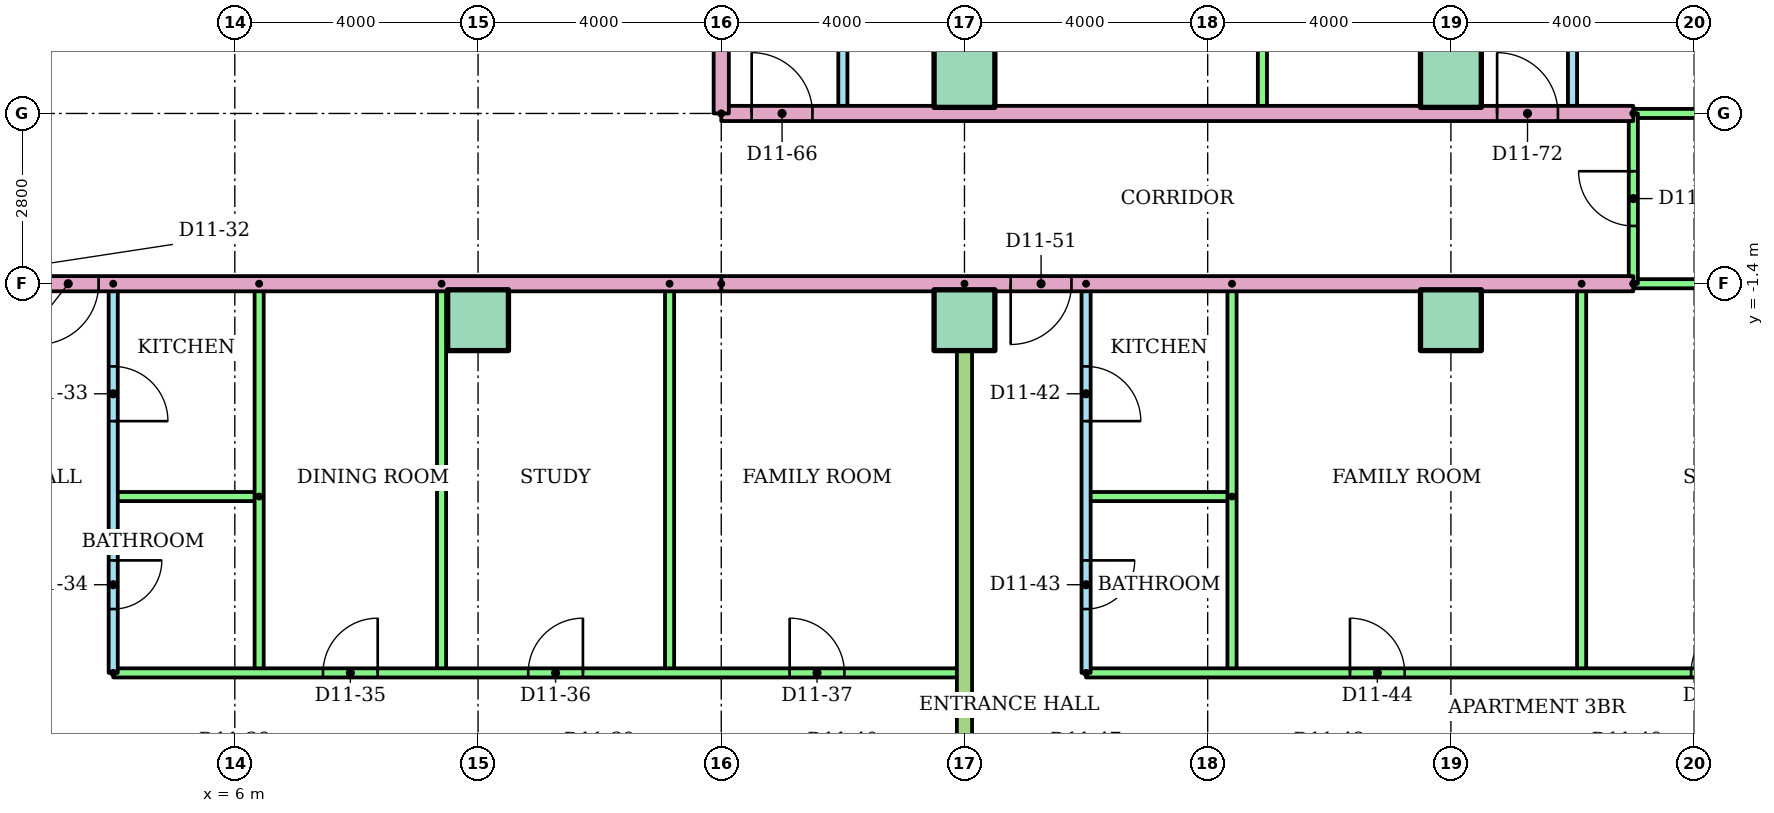
"""IFC4 building model, lengths in metres.
Left out: names, types, materials, properties, quantities, classifications, styles, units other than length and angle.
Written with IfcOpenShell. Run it as: python <this file> out.ifc"""

import sys

from ifc_helpers import new_model, si_unit, direction, frame, frame_2d, origin, origin_2d, place, context, subcontext, project, spatial, rectangle, extrude, element, fill, save


model = new_model("IFC4")
c1 = context("Model", 3, precision=1e-05, world=origin(), true_north=direction((0.0, 1.0)))
c2 = subcontext(c1, "Body", "Model", "MODEL_VIEW")
j1 = project(units=[si_unit("LENGTHUNIT", "METRE"), si_unit("PLANEANGLEUNIT", "RADIAN")], contexts=[c1])
p1 = place(None, origin())
s1 = spatial("IfcSite", under=j1, at=p1, CompositionType="ELEMENT")
p2 = place(p1, origin())
s2 = spatial("IfcBuilding", under=s1, at=p2, CompositionType="ELEMENT")
p3 = place(p2, frame((0.0, 0.0, 44.8)))
s3 = spatial("IfcBuildingStorey", under=s2, at=p3, CompositionType="ELEMENT", Elevation=44.8)
for number, where in (
    (1, (10.0, -2.0, 0.0)),
    (2, (18.0, -2.0, 0.0)),
    (3, (26.0, -2.0, 0.0)),
    (4, (18.0, 2.0, 0.0)),
    (5, (26.0, 2.0, 0.0)),
):
    element("IfcColumn", number, at=place(p3, frame(where)), inside=s3, PredefinedType="COLUMN", context=c2, shape_type="SweptSolid", body=[
        extrude(rectangle(XDim=1.0, YDim=1.0, at=origin_2d()), origin(), (0.0, 0.0, 1.0), 3.2),
    ])
p4 = place(p3, frame((4.0, -1.4, 0.0), z_axis=(0.0, 0.0, 1.0), x_axis=(0.0, -1.0, 0.0)))
e6 = element("IfcWall", 6, at=p4, inside=s3, PredefinedType="PARTITIONING", context=c2, shape_type="SweptSolid", body=[
    extrude(rectangle(XDim=6.4, YDim=0.15, at=frame_2d((3.2, 0.0))), origin(), (0.0, 0.0, 1.0), 2.4),
])
p5 = place(p4, frame((1.36, 0.0, 0.0)))
e7 = element("IfcOpeningElement", 7, at=p5, cuts=e6, PredefinedType="OPENING", context=c2, shape_type="SweptSolid", body=[
    extrude(rectangle(XDim=0.9, YDim=2.1, at=frame_2d((0.45, 1.05))), frame((0.0, 0.085, 0.0), z_axis=(0.0, -1.0, 0.0), x_axis=(1.0, 0.0, 0.0)), (0.0, 0.0, 1.0), 0.17),
])
p6 = place(p4, frame((4.55, 0.0, 0.0)))
e8 = element("IfcOpeningElement", 8, at=p6, cuts=e6, PredefinedType="OPENING", context=c2, shape_type="SweptSolid", body=[
    extrude(rectangle(XDim=0.8, YDim=2.1, at=frame_2d((0.4, 1.05))), frame((0.0, 0.085, 0.0), z_axis=(0.0, -1.0, 0.0), x_axis=(1.0, 0.0, 0.0)), (0.0, 0.0, 1.0), 0.17),
])
p7 = place(p3, frame((6.4, -4.9, 0.0), z_axis=(0.0, 0.0, 1.0), x_axis=(-1.0, 0.0, 0.0)))
e9 = element("IfcWall", 9, at=p7, inside=s3, PredefinedType="PARTITIONING", context=c2, shape_type="SweptSolid", body=[
    extrude(rectangle(XDim=2.4, YDim=0.15, at=frame_2d((1.2, 0.0))), origin(), (0.0, 0.0, 1.0), 2.4),
])
for number, where, z_axis, x_axis in (
    (10, (6.4, -1.4, 0.0), (0.0, 0.0, 1.0), (0.0, -1.0, 0.0)),
    (11, (9.4, -1.4, 0.0), (0.0, 0.0, 1.0), (0.0, -1.0, 0.0)),
    (12, (13.15, -1.4, 0.0), (0.0, 0.0, 1.0), (0.0, -1.0, 0.0)),
):
    element("IfcWall", number, at=place(p3, frame(where, z_axis=z_axis, x_axis=x_axis)), inside=s3, PredefinedType="PARTITIONING", context=c2, shape_type="SweptSolid", body=[
        extrude(rectangle(XDim=6.4, YDim=0.15, at=frame_2d((3.2, 0.0))), origin(), (0.0, 0.0, 1.0), 2.4),
    ])
p8 = place(p3, frame((4.0, -7.8, 0.0)))
e13 = element("IfcWall", 13, at=p8, inside=s3, PredefinedType="PARTITIONING", context=c2, shape_type="SweptSolid", body=[
    extrude(rectangle(XDim=14.0, YDim=0.15, at=frame_2d((7.0, 0.0))), origin(), (0.0, 0.0, 1.0), 2.4),
])
p9 = place(p8, frame((3.45, 0.0, 0.0)))
e14 = element("IfcOpeningElement", 14, at=p9, cuts=e13, PredefinedType="OPENING", context=c2, shape_type="SweptSolid", body=[
    extrude(rectangle(XDim=0.9, YDim=2.1, at=frame_2d((0.45, 1.05))), frame((0.0, 0.085, 0.0), z_axis=(0.0, -1.0, 0.0), x_axis=(1.0, 0.0, 0.0)), (0.0, 0.0, 1.0), 0.17),
])
p10 = place(p8, frame((6.825, 0.0, 0.0)))
e15 = element("IfcOpeningElement", 15, at=p10, cuts=e13, PredefinedType="OPENING", context=c2, shape_type="SweptSolid", body=[
    extrude(rectangle(XDim=0.9, YDim=2.1, at=frame_2d((0.45, 1.05))), frame((0.0, 0.085, 0.0), z_axis=(0.0, -1.0, 0.0), x_axis=(1.0, 0.0, 0.0)), (0.0, 0.0, 1.0), 0.17),
])
p11 = place(p8, frame((11.125, 0.0, 0.0)))
e16 = element("IfcOpeningElement", 16, at=p11, cuts=e13, PredefinedType="OPENING", context=c2, shape_type="SweptSolid", body=[
    extrude(rectangle(XDim=0.9, YDim=2.1, at=frame_2d((0.45, 1.05))), frame((0.0, 0.085, 0.0), z_axis=(0.0, -1.0, 0.0), x_axis=(1.0, 0.0, 0.0)), (0.0, 0.0, 1.0), 0.17),
])
p12 = place(p3, frame((20.0, -1.4, 0.0), z_axis=(0.0, 0.0, 1.0), x_axis=(0.0, -1.0, 0.0)))
e17 = element("IfcWall", 17, at=p12, inside=s3, PredefinedType="PARTITIONING", context=c2, shape_type="SweptSolid", body=[
    extrude(rectangle(XDim=6.4, YDim=0.15, at=frame_2d((3.2, 0.0))), origin(), (0.0, 0.0, 1.0), 2.4),
])
p13 = place(p12, frame((1.36, 0.0, 0.0)))
e18 = element("IfcOpeningElement", 18, at=p13, cuts=e17, PredefinedType="OPENING", context=c2, shape_type="SweptSolid", body=[
    extrude(rectangle(XDim=0.9, YDim=2.1, at=frame_2d((0.45, 1.05))), frame((0.0, 0.085, 0.0), z_axis=(0.0, -1.0, 0.0), x_axis=(1.0, 0.0, 0.0)), (0.0, 0.0, 1.0), 0.17),
])
p14 = place(p12, frame((4.55, 0.0, 0.0)))
e19 = element("IfcOpeningElement", 19, at=p14, cuts=e17, PredefinedType="OPENING", context=c2, shape_type="SweptSolid", body=[
    extrude(rectangle(XDim=0.8, YDim=2.1, at=frame_2d((0.4, 1.05))), frame((0.0, 0.085, 0.0), z_axis=(0.0, -1.0, 0.0), x_axis=(1.0, 0.0, 0.0)), (0.0, 0.0, 1.0), 0.17),
])
p15 = place(p3, frame((22.4, -4.9, 0.0), z_axis=(0.0, 0.0, 1.0), x_axis=(-1.0, 0.0, 0.0)))
e20 = element("IfcWall", 20, at=p15, inside=s3, PredefinedType="PARTITIONING", context=c2, shape_type="SweptSolid", body=[
    extrude(rectangle(XDim=2.4, YDim=0.15, at=frame_2d((1.2, 0.0))), origin(), (0.0, 0.0, 1.0), 2.4),
])
for number, where, z_axis, x_axis in (
    (21, (22.4, -1.4, 0.0), (0.0, 0.0, 1.0), (0.0, -1.0, 0.0)),
    (22, (28.15, -1.4, 0.0), (0.0, 0.0, 1.0), (0.0, -1.0, 0.0)),
):
    element("IfcWall", number, at=place(p3, frame(where, z_axis=z_axis, x_axis=x_axis)), inside=s3, PredefinedType="PARTITIONING", context=c2, shape_type="SweptSolid", body=[
        extrude(rectangle(XDim=6.4, YDim=0.15, at=frame_2d((3.2, 0.0))), origin(), (0.0, 0.0, 1.0), 2.4),
    ])
p16 = place(p3, frame((20.0, -7.8, 0.0)))
e23 = element("IfcWall", 23, at=p16, inside=s3, PredefinedType="PARTITIONING", context=c2, shape_type="SweptSolid", body=[
    extrude(rectangle(XDim=16.52, YDim=0.15, at=frame_2d((8.26, 0.0))), origin(), (0.0, 0.0, 1.0), 2.4),
])
p17 = place(p16, frame((4.34, 0.0, 0.0)))
e24 = element("IfcOpeningElement", 24, at=p17, cuts=e23, PredefinedType="OPENING", context=c2, shape_type="SweptSolid", body=[
    extrude(rectangle(XDim=0.9, YDim=2.1, at=frame_2d((0.45, 1.05))), frame((0.0, 0.085, 0.0), z_axis=(0.0, -1.0, 0.0), x_axis=(1.0, 0.0, 0.0)), (0.0, 0.0, 1.0), 0.17),
])
p18 = place(p16, frame((9.95, 0.0, 0.0)))
e25 = element("IfcOpeningElement", 25, at=p18, cuts=e23, PredefinedType="OPENING", context=c2, shape_type="SweptSolid", body=[
    extrude(rectangle(XDim=0.9, YDim=2.1, at=frame_2d((0.45, 1.05))), frame((0.0, 0.085, 0.0), z_axis=(0.0, -1.0, 0.0), x_axis=(1.0, 0.0, 0.0)), (0.0, 0.0, 1.0), 0.17),
])
p19 = place(p16, frame((14.76, 0.0, 0.0)))
e26 = element("IfcOpeningElement", 26, at=p19, cuts=e23, PredefinedType="OPENING", context=c2, shape_type="SweptSolid", body=[
    extrude(rectangle(XDim=0.9, YDim=2.1, at=frame_2d((0.45, 1.05))), frame((0.0, 0.085, 0.0), z_axis=(0.0, -1.0, 0.0), x_axis=(1.0, 0.0, 0.0)), (0.0, 0.0, 1.0), 0.17),
])
p20 = place(p3, frame((18.0, -1.4, 0.0), z_axis=(0.0, 0.0, 1.0), x_axis=(0.0, -1.0, 0.0)))
e27 = element("IfcWall", 27, at=p20, inside=s3, PredefinedType="PARTITIONING", context=c2, shape_type="SweptSolid", body=[
    extrude(rectangle(XDim=14.71, YDim=0.25, at=frame_2d((7.355, 0.0))), origin(), (0.0, 0.0, 1.0), 2.4),
])
p21 = place(p3, frame((29.0, -1.4, 0.0), z_axis=(0.0, 0.0, 1.0), x_axis=(-1.0, 0.0, 0.0)))
e28 = element("IfcWall", 28, at=p21, inside=s3, PredefinedType="PARTITIONING", context=c2, shape_type="SweptSolid", body=[
    extrude(rectangle(XDim=15.0, YDim=0.25, at=frame_2d((7.5, 0.0))), origin(), (0.0, 0.0, 1.0), 2.4),
])
p22 = place(p21, frame((9.24, 0.0, 0.0)))
e29 = element("IfcOpeningElement", 29, at=p22, cuts=e28, PredefinedType="OPENING", context=c2, shape_type="SweptSolid", body=[
    extrude(rectangle(XDim=1.0, YDim=2.1, at=frame_2d((0.5, 1.05))), frame((0.0, 0.135, 0.0), z_axis=(0.0, -1.0, 0.0), x_axis=(1.0, 0.0, 0.0)), (0.0, 0.0, 1.0), 0.27),
])
p23 = place(p3, frame((36.52, -1.4, 0.0), z_axis=(0.0, 0.0, 1.0), x_axis=(-1.0, 0.0, 0.0)))
e30 = element("IfcWall", 30, at=p23, inside=s3, PredefinedType="PARTITIONING", context=c2, shape_type="SweptSolid", body=[
    extrude(rectangle(XDim=7.52, YDim=0.15, at=frame_2d((3.76, 0.0))), origin(), (0.0, 0.0, 1.0), 2.4),
])
p24 = place(p3, frame((16.0, 10.2, 0.0), z_axis=(0.0, 0.0, 1.0), x_axis=(0.0, -1.0, 0.0)))
e31 = element("IfcWall", 31, at=p24, inside=s3, PredefinedType="PARTITIONING", context=c2, shape_type="SweptSolid", body=[
    extrude(rectangle(XDim=8.8, YDim=0.15, at=frame_2d((4.4, 0.0))), origin(), (0.0, 0.0, 1.0), 2.4),
])
p25 = place(p24, frame((5.975, 0.0, 0.0)))
e32 = element("IfcOpeningElement", 32, at=p25, cuts=e31, PredefinedType="OPENING", context=c2, shape_type="SweptSolid", body=[
    extrude(rectangle(XDim=0.9, YDim=2.1, at=frame_2d((0.45, 1.05))), frame((0.0, 0.085, 0.0), z_axis=(0.0, -1.0, 0.0), x_axis=(1.0, 0.0, 0.0)), (0.0, 0.0, 1.0), 0.17),
])
p26 = place(p24, frame((1.625, 0.0, 0.0)))
e33 = element("IfcOpeningElement", 33, at=p26, cuts=e31, PredefinedType="OPENING", context=c2, shape_type="SweptSolid", body=[
    extrude(rectangle(XDim=0.8, YDim=2.1, at=frame_2d((0.4, 1.05))), frame((0.0, 0.085, 0.0), z_axis=(0.0, -1.0, 0.0), x_axis=(1.0, 0.0, 0.0)), (0.0, 0.0, 1.0), 0.17),
])
for number, where, z_axis, x_axis in (
    (34, (18.4, 10.2, 0.0), (0.0, 0.0, 1.0), (0.0, -1.0, 0.0)),
    (35, (22.9, 10.2, 0.0), (0.0, 0.0, 1.0), (0.0, -1.0, 0.0)),
):
    element("IfcWall", number, at=place(p3, frame(where, z_axis=z_axis, x_axis=x_axis)), inside=s3, PredefinedType="PARTITIONING", context=c2, shape_type="SweptSolid", body=[
        extrude(rectangle(XDim=8.8, YDim=0.15, at=frame_2d((4.4, 0.0))), origin(), (0.0, 0.0, 1.0), 2.4),
    ])
p27 = place(p3, frame((28.0, 10.2, 0.0), z_axis=(0.0, 0.0, 1.0), x_axis=(0.0, -1.0, 0.0)))
e36 = element("IfcWall", 36, at=p27, inside=s3, PredefinedType="PARTITIONING", context=c2, shape_type="SweptSolid", body=[
    extrude(rectangle(XDim=8.8, YDim=0.15, at=frame_2d((4.4, 0.0))), origin(), (0.0, 0.0, 1.0), 2.4),
])
p28 = place(p27, frame((5.975, 0.0, 0.0)))
e37 = element("IfcOpeningElement", 37, at=p28, cuts=e36, PredefinedType="OPENING", context=c2, shape_type="SweptSolid", body=[
    extrude(rectangle(XDim=0.9, YDim=2.1, at=frame_2d((0.45, 1.05))), frame((0.0, 0.085, 0.0), z_axis=(0.0, -1.0, 0.0), x_axis=(1.0, 0.0, 0.0)), (0.0, 0.0, 1.0), 0.17),
])
p29 = place(p27, frame((1.625, 0.0, 0.0)))
e38 = element("IfcOpeningElement", 38, at=p29, cuts=e36, PredefinedType="OPENING", context=c2, shape_type="SweptSolid", body=[
    extrude(rectangle(XDim=0.8, YDim=2.1, at=frame_2d((0.4, 1.05))), frame((0.0, 0.085, 0.0), z_axis=(0.0, -1.0, 0.0), x_axis=(1.0, 0.0, 0.0)), (0.0, 0.0, 1.0), 0.17),
])
p30 = place(p3, frame((26.0, 18.521, 0.0), z_axis=(0.0, 0.0, 1.0), x_axis=(0.0, -1.0, 0.0)))
e39 = element("IfcWall", 39, at=p30, inside=s3, PredefinedType="PARTITIONING", context=c2, shape_type="SweptSolid", body=[
    extrude(rectangle(XDim=17.121, YDim=0.25, at=frame_2d((8.561, 0.0))), origin(), (0.0, 0.0, 1.0), 2.4),
])
p31 = place(p3, frame((14.0, 1.4, 0.0)))
e40 = element("IfcWall", 40, at=p31, inside=s3, PredefinedType="PARTITIONING", context=c2, shape_type="SweptSolid", body=[
    extrude(rectangle(XDim=15.0, YDim=0.25, at=frame_2d((7.5, 0.0))), origin(), (0.0, 0.0, 1.0), 2.4),
])
p32 = place(p31, frame((0.5, 0.0, 0.0)))
e41 = element("IfcOpeningElement", 41, at=p32, cuts=e40, PredefinedType="OPENING", context=c2, shape_type="SweptSolid", body=[
    extrude(rectangle(XDim=1.0, YDim=2.1, at=frame_2d((0.5, 1.05))), frame((0.0, 0.135, 0.0), z_axis=(0.0, -1.0, 0.0), x_axis=(1.0, 0.0, 0.0)), (0.0, 0.0, 1.0), 0.27),
])
p33 = place(p31, frame((12.76, 0.0, 0.0)))
e42 = element("IfcOpeningElement", 42, at=p33, cuts=e40, PredefinedType="OPENING", context=c2, shape_type="SweptSolid", body=[
    extrude(rectangle(XDim=1.0, YDim=2.1, at=frame_2d((0.5, 1.05))), frame((0.0, 0.135, 0.0), z_axis=(0.0, -1.0, 0.0), x_axis=(1.0, 0.0, 0.0)), (0.0, 0.0, 1.0), 0.27),
])
p34 = place(p3, frame((29.0, 1.4, 0.0)))
e43 = element("IfcWall", 43, at=p34, inside=s3, PredefinedType="PARTITIONING", context=c2, shape_type="SweptSolid", body=[
    extrude(rectangle(XDim=7.52, YDim=0.15, at=frame_2d((3.76, 0.0))), origin(), (0.0, 0.0, 1.0), 2.4),
])
p35 = place(p3, frame((29.0, -1.4, 0.0), z_axis=(0.0, 0.0, 1.0), x_axis=(0.0, 1.0, 0.0)))
e44 = element("IfcWall", 44, at=p35, inside=s3, PredefinedType="PARTITIONING", context=c2, shape_type="SweptSolid", body=[
    extrude(rectangle(XDim=2.8, YDim=0.15, at=frame_2d((1.4, 0.0))), origin(), (0.0, 0.0, 1.0), 2.4),
])
p36 = place(p35, frame((0.95, 0.0, 0.0)))
e45 = element("IfcOpeningElement", 45, at=p36, cuts=e44, PredefinedType="OPENING", context=c2, shape_type="SweptSolid", body=[
    extrude(rectangle(XDim=0.9, YDim=2.1, at=frame_2d((0.45, 1.05))), frame((0.0, 0.085, 0.0), z_axis=(0.0, -1.0, 0.0), x_axis=(1.0, 0.0, 0.0)), (0.0, 0.0, 1.0), 0.17),
])
p37 = place(p3, frame((14.0, -1.4, 0.0), z_axis=(0.0, 0.0, 1.0), x_axis=(-1.0, 0.0, 0.0)))
e46 = element("IfcWall", 46, at=p37, inside=s3, PredefinedType="PARTITIONING", context=c2, shape_type="SweptSolid", body=[
    extrude(rectangle(XDim=28.0, YDim=0.25, at=frame_2d((14.0, 0.0))), origin(), (0.0, 0.0, 1.0), 2.4),
])
p38 = place(p37, frame((12.76, 0.0, 0.0)))
e47 = element("IfcOpeningElement", 47, at=p38, cuts=e46, PredefinedType="OPENING", context=c2, shape_type="SweptSolid", body=[
    extrude(rectangle(XDim=1.0, YDim=2.1, at=frame_2d((0.5, 1.05))), frame((0.0, 0.135, 0.0), z_axis=(0.0, -1.0, 0.0), x_axis=(1.0, 0.0, 0.0)), (0.0, 0.0, 1.0), 0.27),
])
p39 = place(p37, frame((10.24, 0.0, 0.0)))
e48 = element("IfcOpeningElement", 48, at=p39, cuts=e46, PredefinedType="OPENING", context=c2, shape_type="SweptSolid", body=[
    extrude(rectangle(XDim=1.0, YDim=2.1, at=frame_2d((0.5, 1.05))), frame((0.0, 0.135, 0.0), z_axis=(0.0, -1.0, 0.0), x_axis=(1.0, 0.0, 0.0)), (0.0, 0.0, 1.0), 0.27),
])
p40 = place(p3, frame((14.0, 1.4, 0.0), z_axis=(0.0, 0.0, 1.0), x_axis=(0.0, 1.0, 0.0)))
e49 = element("IfcWall", 49, at=p40, inside=s3, PredefinedType="PARTITIONING", context=c2, shape_type="SweptSolid", body=[
    extrude(rectangle(XDim=1.6, YDim=0.25, at=frame_2d((0.8, 0.0))), origin(), (0.0, 0.0, 1.0), 2.4),
])
p41 = place(p5, origin())
e50 = element("IfcDoor", 50, at=p41, inside=s3, OperationType="SINGLE_SWING_RIGHT", PredefinedType="DOOR", context=c2, shape_type="SweptSolid", body=[
    extrude(rectangle(XDim=0.9, YDim=2.1, at=frame_2d((0.45, 1.05))), frame((0.0, 0.025, 0.0), z_axis=(0.0, -1.0, 0.0), x_axis=(1.0, 0.0, 0.0)), (0.0, 0.0, 1.0), 0.05),
])
fill(e7, e50)
p42 = place(p6, origin())
e51 = element("IfcDoor", 51, at=p42, inside=s3, OperationType="SINGLE_SWING_LEFT", PredefinedType="DOOR", context=c2, shape_type="SweptSolid", body=[
    extrude(rectangle(XDim=0.8, YDim=2.1, at=frame_2d((0.4, 1.05))), frame((0.0, 0.025, 0.0), z_axis=(0.0, -1.0, 0.0), x_axis=(1.0, 0.0, 0.0)), (0.0, 0.0, 1.0), 0.05),
])
fill(e8, e51)
p43 = place(p9, origin())
e52 = element("IfcDoor", 52, at=p43, inside=s3, OperationType="SINGLE_SWING_RIGHT", PredefinedType="DOOR", context=c2, shape_type="SweptSolid", body=[
    extrude(rectangle(XDim=0.9, YDim=2.1, at=frame_2d((0.45, 1.05))), frame((0.0, 0.025, 0.0), z_axis=(0.0, -1.0, 0.0), x_axis=(1.0, 0.0, 0.0)), (0.0, 0.0, 1.0), 0.05),
])
fill(e14, e52)
p44 = place(p10, origin())
e53 = element("IfcDoor", 53, at=p44, inside=s3, OperationType="SINGLE_SWING_RIGHT", PredefinedType="DOOR", context=c2, shape_type="SweptSolid", body=[
    extrude(rectangle(XDim=0.9, YDim=2.1, at=frame_2d((0.45, 1.05))), frame((0.0, 0.025, 0.0), z_axis=(0.0, -1.0, 0.0), x_axis=(1.0, 0.0, 0.0)), (0.0, 0.0, 1.0), 0.05),
])
fill(e15, e53)
p45 = place(p11, origin())
e54 = element("IfcDoor", 54, at=p45, inside=s3, OperationType="SINGLE_SWING_LEFT", PredefinedType="DOOR", context=c2, shape_type="SweptSolid", body=[
    extrude(rectangle(XDim=0.9, YDim=2.1, at=frame_2d((0.45, 1.05))), frame((0.0, 0.025, 0.0), z_axis=(0.0, -1.0, 0.0), x_axis=(1.0, 0.0, 0.0)), (0.0, 0.0, 1.0), 0.05),
])
fill(e16, e54)
p46 = place(p39, origin())
e55 = element("IfcDoor", 55, at=p46, inside=s3, OperationType="SINGLE_SWING_RIGHT", PredefinedType="DOOR", context=c2, shape_type="SweptSolid", body=[
    extrude(rectangle(XDim=1.0, YDim=2.1, at=frame_2d((0.5, 1.05))), frame((0.0, 0.025, 0.0), z_axis=(0.0, -1.0, 0.0), x_axis=(1.0, 0.0, 0.0)), (0.0, 0.0, 1.0), 0.05),
])
fill(e48, e55)
p47 = place(p13, origin())
e56 = element("IfcDoor", 56, at=p47, inside=s3, OperationType="SINGLE_SWING_RIGHT", PredefinedType="DOOR", context=c2, shape_type="SweptSolid", body=[
    extrude(rectangle(XDim=0.9, YDim=2.1, at=frame_2d((0.45, 1.05))), frame((0.0, 0.025, 0.0), z_axis=(0.0, -1.0, 0.0), x_axis=(1.0, 0.0, 0.0)), (0.0, 0.0, 1.0), 0.05),
])
fill(e18, e56)
p48 = place(p14, origin())
e57 = element("IfcDoor", 57, at=p48, inside=s3, OperationType="SINGLE_SWING_LEFT", PredefinedType="DOOR", context=c2, shape_type="SweptSolid", body=[
    extrude(rectangle(XDim=0.8, YDim=2.1, at=frame_2d((0.4, 1.05))), frame((0.0, 0.025, 0.0), z_axis=(0.0, -1.0, 0.0), x_axis=(1.0, 0.0, 0.0)), (0.0, 0.0, 1.0), 0.05),
])
fill(e19, e57)
p49 = place(p17, origin())
e58 = element("IfcDoor", 58, at=p49, inside=s3, OperationType="SINGLE_SWING_LEFT", PredefinedType="DOOR", context=c2, shape_type="SweptSolid", body=[
    extrude(rectangle(XDim=0.9, YDim=2.1, at=frame_2d((0.45, 1.05))), frame((0.0, 0.025, 0.0), z_axis=(0.0, -1.0, 0.0), x_axis=(1.0, 0.0, 0.0)), (0.0, 0.0, 1.0), 0.05),
])
fill(e24, e58)
p50 = place(p18, origin())
e59 = element("IfcDoor", 59, at=p50, inside=s3, OperationType="SINGLE_SWING_RIGHT", PredefinedType="DOOR", context=c2, shape_type="SweptSolid", body=[
    extrude(rectangle(XDim=0.9, YDim=2.1, at=frame_2d((0.45, 1.05))), frame((0.0, 0.025, 0.0), z_axis=(0.0, -1.0, 0.0), x_axis=(1.0, 0.0, 0.0)), (0.0, 0.0, 1.0), 0.05),
])
fill(e25, e59)
p51 = place(p22, origin())
e60 = element("IfcDoor", 60, at=p51, inside=s3, OperationType="SINGLE_SWING_RIGHT", PredefinedType="DOOR", context=c2, shape_type="SweptSolid", body=[
    extrude(rectangle(XDim=1.0, YDim=2.1, at=frame_2d((0.5, 1.05))), frame((0.0, 0.025, 0.0), z_axis=(0.0, -1.0, 0.0), x_axis=(1.0, 0.0, 0.0)), (0.0, 0.0, 1.0), 0.05),
])
fill(e29, e60)
p52 = place(p32, origin())
e61 = element("IfcDoor", 61, at=p52, inside=s3, OperationType="SINGLE_SWING_LEFT", PredefinedType="DOOR", context=c2, shape_type="SweptSolid", body=[
    extrude(rectangle(XDim=1.0, YDim=2.1, at=frame_2d((0.5, 1.05))), frame((0.0, 0.025, 0.0), z_axis=(0.0, -1.0, 0.0), x_axis=(1.0, 0.0, 0.0)), (0.0, 0.0, 1.0), 0.05),
])
fill(e41, e61)
p53 = place(p33, origin())
e62 = element("IfcDoor", 62, at=p53, inside=s3, OperationType="SINGLE_SWING_LEFT", PredefinedType="DOOR", context=c2, shape_type="SweptSolid", body=[
    extrude(rectangle(XDim=1.0, YDim=2.1, at=frame_2d((0.5, 1.05))), frame((0.0, 0.025, 0.0), z_axis=(0.0, -1.0, 0.0), x_axis=(1.0, 0.0, 0.0)), (0.0, 0.0, 1.0), 0.05),
])
fill(e42, e62)
p54 = place(p36, origin())
e63 = element("IfcDoor", 63, at=p54, inside=s3, OperationType="SINGLE_SWING_RIGHT", PredefinedType="DOOR", context=c2, shape_type="SweptSolid", body=[
    extrude(rectangle(XDim=0.9, YDim=2.1, at=frame_2d((0.45, 1.05))), frame((0.0, 0.025, 0.0), z_axis=(0.0, -1.0, 0.0), x_axis=(1.0, 0.0, 0.0)), (0.0, 0.0, 1.0), 0.05),
])
fill(e45, e63)
save(model, sys.argv[1])
